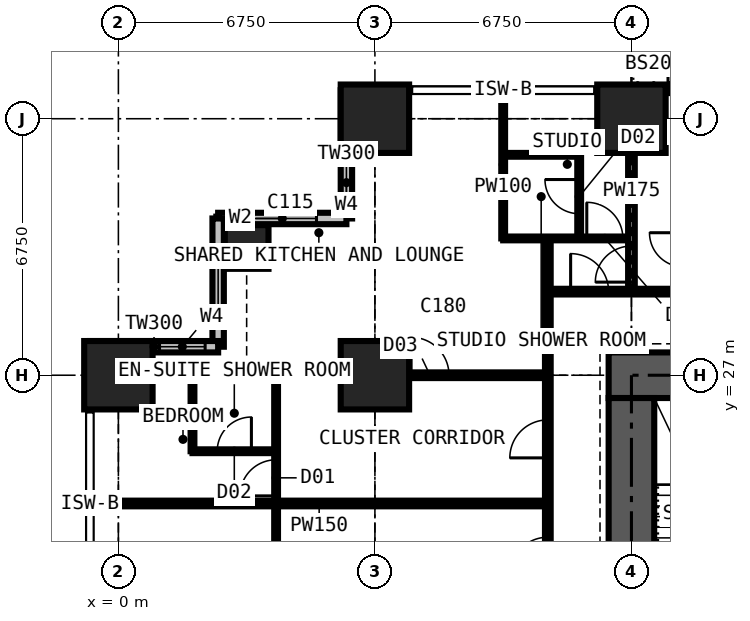
"""IFC4 building model, lengths in metres.
Left out: names, types, materials, properties, quantities, classifications, styles, units other than length and angle.
Written with IfcOpenShell. Run it as: python <this file> out.ifc"""

import sys

from ifc_helpers import new_model, si_unit, direction, frame, frame_2d, origin, origin_2d, place, context, subcontext, project, spatial, rectangle, extrude, element, fill, save


model = new_model("IFC4")
c1 = context("Model", 3, precision=1e-05, world=origin(), true_north=direction((0.0, 1.0)))
c2 = subcontext(c1, "Body", "Model", "MODEL_VIEW")
j1 = project(units=[si_unit("LENGTHUNIT", "METRE"), si_unit("PLANEANGLEUNIT", "RADIAN")], contexts=[c1])
p1 = place(None, origin())
s1 = spatial("IfcSite", under=j1, at=p1, CompositionType="ELEMENT")
p2 = place(p1, origin())
s2 = spatial("IfcBuilding", under=s1, at=p2, CompositionType="ELEMENT")
p3 = place(p2, frame((0.0, 0.0, 101.7)))
s3 = spatial("IfcBuildingStorey", under=s2, at=p3, CompositionType="ELEMENT", Elevation=101.7)
p4 = place(p3, frame((0.0, 27.0, 0.0), z_axis=(0.0, 0.0, 1.0), x_axis=(1.0, 0.0, 0.0)))
e1 = element("IfcColumn", 1, at=p4, inside=s3, PredefinedType="COLUMN", context=c2, shape_type="SweptSolid", body=[
    extrude(rectangle(XDim=1.8, YDim=1.8, at=origin_2d()), origin(), (0.0, 0.0, 1.0), 3.6),
])
p5 = place(p3, frame((3.375, 30.375, 0.0), z_axis=(0.0, 0.0, 1.0), x_axis=(1.0, 0.0, 0.0)))
e2 = element("IfcColumn", 2, at=p5, inside=s3, PredefinedType="COLUMN", context=c2, shape_type="SweptSolid", body=[
    extrude(rectangle(XDim=1.15, YDim=1.15, at=origin_2d()), origin(), (0.0, 0.0, 1.0), 3.6),
])
for number, where, z_axis, x_axis in (
    (3, (6.75, 27.0, 0.0), (0.0, 0.0, 1.0), (1.0, 0.0, 0.0)),
    (4, (6.75, 33.75, 0.0), (0.0, 0.0, 1.0), (1.0, 0.0, 0.0)),
    (5, (13.5, 33.75, 0.0), (0.0, 0.0, 1.0), (1.0, 0.0, 0.0)),
):
    element("IfcColumn", number, at=place(p3, frame(where, z_axis=z_axis, x_axis=x_axis)), inside=s3, PredefinedType="COLUMN", context=c2, shape_type="SweptSolid", body=[
        extrude(rectangle(XDim=1.8, YDim=1.8, at=origin_2d()), origin(), (0.0, 0.0, 1.0), 3.6),
    ])
p6 = place(p3, frame((27.6, 27.0, 0.0), z_axis=(0.0, 0.0, 1.0), x_axis=(-1.0, 0.0, 0.0)))
e6 = element("IfcWall", 6, at=p6, inside=s3, PredefinedType="SHEAR", context=c2, shape_type="SweptSolid", body=[
    extrude(rectangle(XDim=14.7, YDim=1.2, at=frame_2d((7.35, 0.0))), origin(), (0.0, 0.0, 1.0), 3.6),
])
p7 = place(p6, frame((5.225, 0.0, 0.0)))
e7 = element("IfcOpeningElement", 7, at=p7, cuts=e6, PredefinedType="OPENING", context=c2, shape_type="SweptSolid", body=[
    extrude(rectangle(XDim=0.9, YDim=2.2, at=frame_2d((0.45, 1.1))), frame((0.0, 0.61, 0.0), z_axis=(0.0, -1.0, 0.0), x_axis=(1.0, 0.0, 0.0)), (0.0, 0.0, 1.0), 1.22),
])
p8 = place(p6, frame((8.2, 0.0, 0.0)))
e8 = element("IfcOpeningElement", 8, at=p8, cuts=e6, PredefinedType="OPENING", context=c2, shape_type="SweptSolid", body=[
    extrude(rectangle(XDim=1.0, YDim=2.2, at=frame_2d((0.5, 1.1))), frame((0.0, 0.61, 0.0), z_axis=(0.0, -1.0, 0.0), x_axis=(1.0, 0.0, 0.0)), (0.0, 0.0, 1.0), 1.22),
])
p9 = place(p3, frame((13.5, 26.4, 0.0), z_axis=(0.0, 0.0, 1.0), x_axis=(0.0, -1.0, 0.0)))
e9 = element("IfcWall", 9, at=p9, inside=s3, PredefinedType="SHEAR", context=c2, shape_type="SweptSolid", body=[
    extrude(rectangle(XDim=12.3, YDim=1.2, at=frame_2d((6.15, 0.0))), origin(), (0.0, 0.0, 1.0), 3.6),
])
p10 = place(p9, frame((7.45, 0.0, 0.0)))
e10 = element("IfcOpeningElement", 10, at=p10, cuts=e9, PredefinedType="OPENING", context=c2, shape_type="SweptSolid", body=[
    extrude(rectangle(XDim=1.2, YDim=2.2, at=frame_2d((0.6, 1.1))), frame((0.0, 0.61, 0.0), z_axis=(0.0, -1.0, 0.0), x_axis=(1.0, 0.0, 0.0)), (0.0, 0.0, 1.0), 1.22),
])
p11 = place(p3, frame((13.5, 34.5, 0.0), z_axis=(0.0, 0.0, 1.0), x_axis=(1.0, 0.0, 0.0)))
e11 = element("IfcWall", 11, at=p11, inside=s3, PredefinedType="SOLIDWALL", context=c2, shape_type="SweptSolid", body=[
    extrude(rectangle(XDim=6.75, YDim=0.15, at=frame_2d((3.375, 0.0))), origin(), (0.0, 0.0, 1.0), 3.375),
])
p12 = place(p11, frame((0.962, 0.0, 0.0)))
e12 = element("IfcOpeningElement", 12, at=p12, cuts=e11, PredefinedType="OPENING", context=c2, shape_type="SweptSolid", body=[
    extrude(rectangle(XDim=1.0, YDim=2.2, at=frame_2d((0.5, 1.1))), frame((0.0, 0.085, 0.0), z_axis=(0.0, -1.0, 0.0), x_axis=(1.0, 0.0, 0.0)), (0.0, 0.0, 1.0), 0.17),
])
p13 = place(p11, frame((2.025, 0.0, 0.9)))
e13 = element("IfcOpeningElement", 13, at=p13, cuts=e11, PredefinedType="OPENING", context=c2, shape_type="SweptSolid", body=[
    extrude(rectangle(XDim=1.2, YDim=1.8, at=frame_2d((0.6, 0.9))), frame((0.0, 0.085, 0.0), z_axis=(0.0, -1.0, 0.0), x_axis=(1.0, 0.0, 0.0)), (0.0, 0.0, 1.0), 0.17),
])
p14 = place(p11, frame((4.788, 0.0, 0.0)))
e14 = element("IfcOpeningElement", 14, at=p14, cuts=e11, PredefinedType="OPENING", context=c2, shape_type="SweptSolid", body=[
    extrude(rectangle(XDim=1.0, YDim=2.2, at=frame_2d((0.5, 1.1))), frame((0.0, 0.085, 0.0), z_axis=(0.0, -1.0, 0.0), x_axis=(1.0, 0.0, 0.0)), (0.0, 0.0, 1.0), 0.17),
])
p15 = place(p11, frame((3.525, 0.0, 0.9)))
e15 = element("IfcOpeningElement", 15, at=p15, cuts=e11, PredefinedType="OPENING", context=c2, shape_type="SweptSolid", body=[
    extrude(rectangle(XDim=1.2, YDim=1.8, at=frame_2d((0.6, 0.9))), frame((0.0, 0.085, 0.0), z_axis=(0.0, -1.0, 0.0), x_axis=(1.0, 0.0, 0.0)), (0.0, 0.0, 1.0), 0.17),
])
p16 = place(p3, frame((6.0, 34.5, 0.0), z_axis=(0.0, 0.0, 1.0), x_axis=(0.0, -1.0, 0.0)))
e16 = element("IfcWall", 16, at=p16, inside=s3, PredefinedType="SOLIDWALL", context=c2, shape_type="SweptSolid", body=[
    extrude(rectangle(XDim=3.375, YDim=0.3, at=frame_2d((1.688, 0.0))), origin(), (0.0, 0.0, 1.0), 3.375),
])
p17 = place(p16, frame((1.833, 0.0, 0.9)))
e17 = element("IfcOpeningElement", 17, at=p17, cuts=e16, PredefinedType="OPENING", context=c2, shape_type="SweptSolid", body=[
    extrude(rectangle(XDim=1.2, YDim=1.8, at=frame_2d((0.6, 0.9))), frame((0.0, 0.16, 0.0), z_axis=(0.0, -1.0, 0.0), x_axis=(1.0, 0.0, 0.0)), (0.0, 0.0, 1.0), 0.32),
])
p18 = place(p3, frame((6.0, 31.125, 0.0), z_axis=(0.0, 0.0, 1.0), x_axis=(-1.0, 0.0, 0.0)))
e18 = element("IfcWall", 18, at=p18, inside=s3, PredefinedType="SOLIDWALL", context=c2, shape_type="SweptSolid", body=[
    extrude(rectangle(XDim=3.375, YDim=0.3, at=frame_2d((1.688, 0.0))), origin(), (0.0, 0.0, 1.0), 3.375),
])
p19 = place(p18, frame((0.788, 0.0, 0.6)))
e19 = element("IfcOpeningElement", 19, at=p19, cuts=e18, PredefinedType="OPENING", context=c2, shape_type="SweptSolid", body=[
    extrude(rectangle(XDim=1.8, YDim=2.1, at=frame_2d((0.9, 1.05))), frame((0.0, 0.16, 0.0), z_axis=(0.0, -1.0, 0.0), x_axis=(1.0, 0.0, 0.0)), (0.0, 0.0, 1.0), 0.32),
])
p20 = place(p3, frame((2.625, 31.125, 0.0), z_axis=(0.0, 0.0, 1.0), x_axis=(0.0, -1.0, 0.0)))
e20 = element("IfcWall", 20, at=p20, inside=s3, PredefinedType="SOLIDWALL", context=c2, shape_type="SweptSolid", body=[
    extrude(rectangle(XDim=3.375, YDim=0.3, at=frame_2d((1.688, 0.0))), origin(), (0.0, 0.0, 1.0), 3.375),
])
p21 = place(p20, frame((0.788, 0.0, 0.6)))
e21 = element("IfcOpeningElement", 21, at=p21, cuts=e20, PredefinedType="OPENING", context=c2, shape_type="SweptSolid", body=[
    extrude(rectangle(XDim=1.8, YDim=2.1, at=frame_2d((0.9, 1.05))), frame((0.0, 0.16, 0.0), z_axis=(0.0, -1.0, 0.0), x_axis=(1.0, 0.0, 0.0)), (0.0, 0.0, 1.0), 0.32),
])
p22 = place(p3, frame((2.625, 27.75, 0.0), z_axis=(0.0, 0.0, 1.0), x_axis=(-1.0, 0.0, 0.0)))
e22 = element("IfcWall", 22, at=p22, inside=s3, PredefinedType="SOLIDWALL", context=c2, shape_type="SweptSolid", body=[
    extrude(rectangle(XDim=3.375, YDim=0.3, at=frame_2d((1.688, 0.0))), origin(), (0.0, 0.0, 1.0), 3.375),
])
p23 = place(p22, frame((0.343, 0.0, 0.9)))
e23 = element("IfcOpeningElement", 23, at=p23, cuts=e22, PredefinedType="OPENING", context=c2, shape_type="SweptSolid", body=[
    extrude(rectangle(XDim=1.2, YDim=1.8, at=frame_2d((0.6, 0.9))), frame((0.0, 0.16, 0.0), z_axis=(0.0, -1.0, 0.0), x_axis=(1.0, 0.0, 0.0)), (0.0, 0.0, 1.0), 0.32),
])
p24 = place(p3, frame((-0.734, 23.625, 0.0), z_axis=(0.0, 0.0, 1.0), x_axis=(1.0, 0.0, 0.0)))
e24 = element("IfcWall", 24, at=p24, inside=s3, PredefinedType="PARTITIONING", context=c2, shape_type="SweptSolid", body=[
    extrude(rectangle(XDim=12.034, YDim=0.15, at=frame_2d((6.017, 0.0))), origin(), (0.0, 0.0, 1.0), 3.375),
])
p25 = place(p3, frame((-0.734, 27.0, 0.0), z_axis=(0.0, 0.0, 1.0), x_axis=(1.0, 0.0, 0.0)))
e25 = element("IfcWall", 25, at=p25, inside=s3, PredefinedType="PARTITIONING", context=c2, shape_type="SweptSolid", body=[
    extrude(rectangle(XDim=12.034, YDim=0.15, at=frame_2d((6.017, 0.0))), origin(), (0.0, 0.0, 1.0), 2.806),
])
p26 = place(p25, frame((8.434, 0.0, 0.0)))
e26 = element("IfcOpeningElement", 26, at=p26, cuts=e25, PredefinedType="OPENING", context=c2, shape_type="SweptSolid", body=[
    extrude(rectangle(XDim=1.0, YDim=2.2, at=frame_2d((0.5, 1.1))), frame((0.0, 0.085, 0.0), z_axis=(0.0, -1.0, 0.0), x_axis=(1.0, 0.0, 0.0)), (0.0, 0.0, 1.0), 0.17),
])
p27 = place(p3, frame((1.95, 25.0, 0.0), z_axis=(0.0, 0.0, 1.0), x_axis=(0.0, 1.0, 0.0)))
e27 = element("IfcWall", 27, at=p27, inside=s3, PredefinedType="PARTITIONING", context=c2, shape_type="SweptSolid", body=[
    extrude(rectangle(XDim=2.0, YDim=0.1, at=frame_2d((1.0, 0.0))), origin(), (0.0, 0.0, 1.0), 3.375),
])
p28 = place(p3, frame((1.95, 25.0, 0.0), z_axis=(0.0, 0.0, 1.0), x_axis=(1.0, 0.0, 0.0)))
e28 = element("IfcWall", 28, at=p28, inside=s3, PredefinedType="PARTITIONING", context=c2, shape_type="SweptSolid", body=[
    extrude(rectangle(XDim=2.2, YDim=0.1, at=frame_2d((1.1, 0.0))), origin(), (0.0, 0.0, 1.0), 3.375),
])
p29 = place(p28, frame((0.65, 0.0, 0.0)))
e29 = element("IfcOpeningElement", 29, at=p29, cuts=e28, PredefinedType="OPENING", context=c2, shape_type="SweptSolid", body=[
    extrude(rectangle(XDim=0.9, YDim=2.2, at=frame_2d((0.45, 1.1))), frame((0.0, 0.06, 0.0), z_axis=(0.0, -1.0, 0.0), x_axis=(1.0, 0.0, 0.0)), (0.0, 0.0, 1.0), 0.12),
])
p30 = place(p3, frame((4.15, 10.125, 0.0), z_axis=(0.0, 0.0, 1.0), x_axis=(0.0, 1.0, 0.0)))
e30 = element("IfcWall", 30, at=p30, inside=s3, PredefinedType="PARTITIONING", context=c2, shape_type="SweptSolid", body=[
    extrude(rectangle(XDim=16.875, YDim=0.1, at=frame_2d((8.438, 0.0))), origin(), (0.0, 0.0, 1.0), 3.375),
])
p31 = place(p30, frame((13.7, 0.0, 0.0)))
e31 = element("IfcOpeningElement", 31, at=p31, cuts=e30, PredefinedType="OPENING", context=c2, shape_type="SweptSolid", body=[
    extrude(rectangle(XDim=0.95, YDim=2.2, at=frame_2d((0.475, 1.1))), frame((0.0, 0.06, 0.0), z_axis=(0.0, -1.0, 0.0), x_axis=(1.0, 0.0, 0.0)), (0.0, 0.0, 1.0), 0.12),
])
p32 = place(p30, frame((4.2, 0.0, 0.0)))
e32 = element("IfcOpeningElement", 32, at=p32, cuts=e30, PredefinedType="OPENING", context=c2, shape_type="SweptSolid", body=[
    extrude(rectangle(XDim=0.95, YDim=2.2, at=frame_2d((0.475, 1.1))), frame((0.0, 0.06, 0.0), z_axis=(0.0, -1.0, 0.0), x_axis=(1.0, 0.0, 0.0)), (0.0, 0.0, 1.0), 0.12),
])
p33 = place(p30, frame((10.95, 0.0, 0.0)))
e33 = element("IfcOpeningElement", 33, at=p33, cuts=e30, PredefinedType="OPENING", context=c2, shape_type="SweptSolid", body=[
    extrude(rectangle(XDim=0.95, YDim=2.2, at=frame_2d((0.475, 1.1))), frame((0.0, 0.06, 0.0), z_axis=(0.0, -1.0, 0.0), x_axis=(1.0, 0.0, 0.0)), (0.0, 0.0, 1.0), 0.12),
])
p34 = place(p3, frame((10.125, 30.6, 0.0), z_axis=(0.0, 0.0, 1.0), x_axis=(0.0, 1.0, 0.0)))
e34 = element("IfcWall", 34, at=p34, inside=s3, PredefinedType="PARTITIONING", context=c2, shape_type="SweptSolid", body=[
    extrude(rectangle(XDim=3.884, YDim=0.1, at=frame_2d((1.942, 0.0))), origin(), (0.0, 0.0, 1.0), 3.375),
])
p35 = place(p3, frame((10.125, 30.6, 0.0), z_axis=(0.0, 0.0, 1.0), x_axis=(1.0, 0.0, 0.0)))
e35 = element("IfcWall", 35, at=p35, inside=s3, PredefinedType="PARTITIONING", context=c2, shape_type="SweptSolid", body=[
    extrude(rectangle(XDim=3.375, YDim=0.1, at=frame_2d((1.688, 0.0))), origin(), (0.0, 0.0, 1.0), 3.375),
])
p36 = place(p35, frame((2.2, 0.0, 0.0)))
e36 = element("IfcOpeningElement", 36, at=p36, cuts=e35, PredefinedType="OPENING", context=c2, shape_type="SweptSolid", body=[
    extrude(rectangle(XDim=0.95, YDim=2.2, at=frame_2d((0.475, 1.1))), frame((0.0, 0.06, 0.0), z_axis=(0.0, -1.0, 0.0), x_axis=(1.0, 0.0, 0.0)), (0.0, 0.0, 1.0), 0.12),
])
p37 = place(p3, frame((10.125, 32.8, 0.0), z_axis=(0.0, 0.0, 1.0), x_axis=(1.0, 0.0, 0.0)))
e37 = element("IfcWall", 37, at=p37, inside=s3, PredefinedType="PARTITIONING", context=c2, shape_type="SweptSolid", body=[
    extrude(rectangle(XDim=2.0, YDim=0.1, at=frame_2d((1.0, 0.0))), origin(), (0.0, 0.0, 1.0), 3.375),
])
p38 = place(p3, frame((11.3, 11.3, 0.0), z_axis=(0.0, 0.0, 1.0), x_axis=(0.0, 1.0, 0.0)))
e38 = element("IfcWall", 38, at=p38, inside=s3, PredefinedType="PARTITIONING", context=c2, shape_type="SweptSolid", body=[
    extrude(rectangle(XDim=19.3, YDim=0.15, at=frame_2d((9.65, 0.0))), origin(), (0.0, 0.0, 1.0), 3.375),
])
p39 = place(p38, frame((13.525, 0.0, 0.0)))
e39 = element("IfcOpeningElement", 39, at=p39, cuts=e38, PredefinedType="OPENING", context=c2, shape_type="SweptSolid", body=[
    extrude(rectangle(XDim=1.0, YDim=2.2, at=frame_2d((0.5, 1.1))), frame((0.0, 0.085, 0.0), z_axis=(0.0, -1.0, 0.0), x_axis=(1.0, 0.0, 0.0)), (0.0, 0.0, 1.0), 0.17),
])
p40 = place(p38, frame((10.438, 0.0, 0.0)))
e40 = element("IfcOpeningElement", 40, at=p40, cuts=e38, PredefinedType="OPENING", context=c2, shape_type="SweptSolid", body=[
    extrude(rectangle(XDim=1.0, YDim=2.2, at=frame_2d((0.5, 1.1))), frame((0.0, 0.085, 0.0), z_axis=(0.0, -1.0, 0.0), x_axis=(1.0, 0.0, 0.0)), (0.0, 0.0, 1.0), 0.17),
])
p41 = place(p3, frame((11.3, 29.2, 0.0), z_axis=(0.0, 0.0, 1.0), x_axis=(1.0, 0.0, 0.0)))
e41 = element("IfcWall", 41, at=p41, inside=s3, PredefinedType="PARTITIONING", context=c2, shape_type="SweptSolid", body=[
    extrude(rectangle(XDim=19.075, YDim=0.15, at=frame_2d((9.538, 0.0))), origin(), (0.0, 0.0, 1.0), 3.375),
])
p42 = place(p41, frame((5.825, 0.0, 0.0)))
e42 = element("IfcOpeningElement", 42, at=p42, cuts=e41, PredefinedType="OPENING", context=c2, shape_type="SweptSolid", body=[
    extrude(rectangle(XDim=0.95, YDim=2.2, at=frame_2d((0.475, 1.1))), frame((0.0, 0.085, 0.0), z_axis=(0.0, -1.0, 0.0), x_axis=(1.0, 0.0, 0.0)), (0.0, 0.0, 1.0), 0.17),
])
p43 = place(p41, frame((9.2, 0.0, 0.0)))
e43 = element("IfcOpeningElement", 43, at=p43, cuts=e41, PredefinedType="OPENING", context=c2, shape_type="SweptSolid", body=[
    extrude(rectangle(XDim=0.95, YDim=2.2, at=frame_2d((0.475, 1.1))), frame((0.0, 0.085, 0.0), z_axis=(0.0, -1.0, 0.0), x_axis=(1.0, 0.0, 0.0)), (0.0, 0.0, 1.0), 0.17),
])
p44 = place(p41, frame((0.6, 0.0, 0.0)))
e44 = element("IfcOpeningElement", 44, at=p44, cuts=e41, PredefinedType="OPENING", context=c2, shape_type="SweptSolid", body=[
    extrude(rectangle(XDim=1.0, YDim=2.2, at=frame_2d((0.5, 1.1))), frame((0.0, 0.085, 0.0), z_axis=(0.0, -1.0, 0.0), x_axis=(1.0, 0.0, 0.0)), (0.0, 0.0, 1.0), 0.17),
])
p45 = place(p3, frame((12.125, 30.6, 0.0), z_axis=(0.0, 0.0, 1.0), x_axis=(0.0, 1.0, 0.0)))
e45 = element("IfcWall", 45, at=p45, inside=s3, PredefinedType="PARTITIONING", context=c2, shape_type="SweptSolid", body=[
    extrude(rectangle(XDim=2.2, YDim=0.1, at=frame_2d((1.1, 0.0))), origin(), (0.0, 0.0, 1.0), 3.375),
])
p46 = place(p45, frame((0.65, 0.0, 0.0)))
e46 = element("IfcOpeningElement", 46, at=p46, cuts=e45, PredefinedType="OPENING", context=c2, shape_type="SweptSolid", body=[
    extrude(rectangle(XDim=0.9, YDim=2.2, at=frame_2d((0.45, 1.1))), frame((0.0, 0.06, 0.0), z_axis=(0.0, -1.0, 0.0), x_axis=(1.0, 0.0, 0.0)), (0.0, 0.0, 1.0), 0.12),
])
p47 = place(p3, frame((13.5, 29.2, 0.0), z_axis=(0.0, 0.0, 1.0), x_axis=(0.0, 1.0, 0.0)))
e47 = element("IfcWall", 47, at=p47, inside=s3, PredefinedType="PARTITIONING", context=c2, shape_type="SweptSolid", body=[
    extrude(rectangle(XDim=5.284, YDim=0.175, at=frame_2d((2.642, 0.0))), origin(), (0.0, 0.0, 1.0), 2.806),
])
p48 = place(p47, frame((0.25, 0.0, 0.0)))
e48 = element("IfcOpeningElement", 48, at=p48, cuts=e47, PredefinedType="OPENING", context=c2, shape_type="SweptSolid", body=[
    extrude(rectangle(XDim=0.95, YDim=2.2, at=frame_2d((0.475, 1.1))), frame((0.0, 0.097, 0.0), z_axis=(0.0, -1.0, 0.0), x_axis=(1.0, 0.0, 0.0)), (0.0, 0.0, 1.0), 0.195),
])
p49 = place(p12, origin())
e49 = element("IfcDoor", 49, at=p49, inside=s3, OperationType="SINGLE_SWING_LEFT", PredefinedType="DOOR", context=c2, shape_type="SweptSolid", body=[
    extrude(rectangle(XDim=1.0, YDim=2.2, at=frame_2d((0.5, 1.1))), frame((0.0, 0.025, 0.0), z_axis=(0.0, -1.0, 0.0), x_axis=(1.0, 0.0, 0.0)), (0.0, 0.0, 1.0), 0.05),
])
fill(e12, e49)
p50 = place(p17, origin())
e50 = element("IfcWindow", 50, at=p50, inside=s3, PartitioningType="SINGLE_PANEL", PredefinedType="WINDOW", context=c2, shape_type="SweptSolid", body=[
    extrude(rectangle(XDim=1.2, YDim=1.8, at=frame_2d((0.6, 0.9))), frame((0.0, 0.03, 0.0), z_axis=(0.0, -1.0, 0.0), x_axis=(1.0, 0.0, 0.0)), (0.0, 0.0, 1.0), 0.06),
])
fill(e17, e50)
p51 = place(p19, origin())
e51 = element("IfcWindow", 51, at=p51, inside=s3, PartitioningType="SINGLE_PANEL", PredefinedType="WINDOW", context=c2, shape_type="SweptSolid", body=[
    extrude(rectangle(XDim=1.8, YDim=2.1, at=frame_2d((0.9, 1.05))), frame((0.0, 0.03, 0.0), z_axis=(0.0, -1.0, 0.0), x_axis=(1.0, 0.0, 0.0)), (0.0, 0.0, 1.0), 0.06),
])
fill(e19, e51)
p52 = place(p21, origin())
e52 = element("IfcWindow", 52, at=p52, inside=s3, PartitioningType="SINGLE_PANEL", PredefinedType="WINDOW", context=c2, shape_type="SweptSolid", body=[
    extrude(rectangle(XDim=1.8, YDim=2.1, at=frame_2d((0.9, 1.05))), frame((0.0, 0.03, 0.0), z_axis=(0.0, -1.0, 0.0), x_axis=(1.0, 0.0, 0.0)), (0.0, 0.0, 1.0), 0.06),
])
fill(e21, e52)
p53 = place(p23, origin())
e53 = element("IfcWindow", 53, at=p53, inside=s3, PartitioningType="SINGLE_PANEL", PredefinedType="WINDOW", context=c2, shape_type="SweptSolid", body=[
    extrude(rectangle(XDim=1.2, YDim=1.8, at=frame_2d((0.6, 0.9))), frame((0.0, 0.03, 0.0), z_axis=(0.0, -1.0, 0.0), x_axis=(1.0, 0.0, 0.0)), (0.0, 0.0, 1.0), 0.06),
])
fill(e23, e53)
p54 = place(p36, origin())
e54 = element("IfcDoor", 54, at=p54, inside=s3, OperationType="SINGLE_SWING_LEFT", PredefinedType="DOOR", context=c2, shape_type="SweptSolid", body=[
    extrude(rectangle(XDim=0.95, YDim=2.2, at=frame_2d((0.475, 1.1))), frame((0.0, 0.025, 0.0), z_axis=(0.0, -1.0, 0.0), x_axis=(1.0, 0.0, 0.0)), (0.0, 0.0, 1.0), 0.05),
])
fill(e36, e54)
p55 = place(p46, origin())
e55 = element("IfcDoor", 55, at=p55, inside=s3, OperationType="SINGLE_SWING_RIGHT", PredefinedType="DOOR", context=c2, shape_type="SweptSolid", body=[
    extrude(rectangle(XDim=0.9, YDim=2.2, at=frame_2d((0.45, 1.1))), frame((0.0, 0.025, 0.0), z_axis=(0.0, -1.0, 0.0), x_axis=(1.0, 0.0, 0.0)), (0.0, 0.0, 1.0), 0.05),
])
fill(e46, e55)
p56 = place(p48, origin())
e56 = element("IfcDoor", 56, at=p56, inside=s3, OperationType="SINGLE_SWING_LEFT", PredefinedType="DOOR", context=c2, shape_type="SweptSolid", body=[
    extrude(rectangle(XDim=0.95, YDim=2.2, at=frame_2d((0.475, 1.1))), frame((0.0, 0.025, 0.0), z_axis=(0.0, -1.0, 0.0), x_axis=(1.0, 0.0, 0.0)), (0.0, 0.0, 1.0), 0.05),
])
fill(e48, e56)
p57 = place(p44, origin())
e57 = element("IfcDoor", 57, at=p57, inside=s3, OperationType="SINGLE_SWING_LEFT", PredefinedType="DOOR", context=c2, shape_type="SweptSolid", body=[
    extrude(rectangle(XDim=1.0, YDim=2.2, at=frame_2d((0.5, 1.1))), frame((0.0, 0.025, 0.0), z_axis=(0.0, -1.0, 0.0), x_axis=(1.0, 0.0, 0.0)), (0.0, 0.0, 1.0), 0.05),
])
fill(e44, e57)
p58 = place(p26, origin())
e58 = element("IfcDoor", 58, at=p58, inside=s3, OperationType="SINGLE_SWING_LEFT", PredefinedType="DOOR", context=c2, shape_type="SweptSolid", body=[
    extrude(rectangle(XDim=1.0, YDim=2.2, at=frame_2d((0.5, 1.1))), frame((0.0, 0.025, 0.0), z_axis=(0.0, -1.0, 0.0), x_axis=(1.0, 0.0, 0.0)), (0.0, 0.0, 1.0), 0.05),
])
fill(e26, e58)
p59 = place(p31, origin())
e59 = element("IfcDoor", 59, at=p59, inside=s3, OperationType="SINGLE_SWING_LEFT", PredefinedType="DOOR", context=c2, shape_type="SweptSolid", body=[
    extrude(rectangle(XDim=0.95, YDim=2.2, at=frame_2d((0.475, 1.1))), frame((0.0, 0.025, 0.0), z_axis=(0.0, -1.0, 0.0), x_axis=(1.0, 0.0, 0.0)), (0.0, 0.0, 1.0), 0.05),
])
fill(e31, e59)
p60 = place(p29, origin())
e60 = element("IfcDoor", 60, at=p60, inside=s3, OperationType="SINGLE_SWING_RIGHT", PredefinedType="DOOR", context=c2, shape_type="SweptSolid", body=[
    extrude(rectangle(XDim=0.9, YDim=2.2, at=frame_2d((0.45, 1.1))), frame((0.0, 0.025, 0.0), z_axis=(0.0, -1.0, 0.0), x_axis=(1.0, 0.0, 0.0)), (0.0, 0.0, 1.0), 0.05),
])
fill(e29, e60)
p61 = place(p39, origin())
e61 = element("IfcDoor", 61, at=p61, inside=s3, OperationType="SINGLE_SWING_LEFT", PredefinedType="DOOR", context=c2, shape_type="SweptSolid", body=[
    extrude(rectangle(XDim=1.0, YDim=2.2, at=frame_2d((0.5, 1.1))), frame((0.0, 0.025, 0.0), z_axis=(0.0, -1.0, 0.0), x_axis=(1.0, 0.0, 0.0)), (0.0, 0.0, 1.0), 0.05),
])
fill(e39, e61)
p62 = place(p40, origin())
e62 = element("IfcDoor", 62, at=p62, inside=s3, OperationType="SINGLE_SWING_LEFT", PredefinedType="DOOR", context=c2, shape_type="SweptSolid", body=[
    extrude(rectangle(XDim=1.0, YDim=2.2, at=frame_2d((0.5, 1.1))), frame((0.0, 0.025, 0.0), z_axis=(0.0, -1.0, 0.0), x_axis=(1.0, 0.0, 0.0)), (0.0, 0.0, 1.0), 0.05),
])
fill(e40, e62)
save(model, sys.argv[1])
